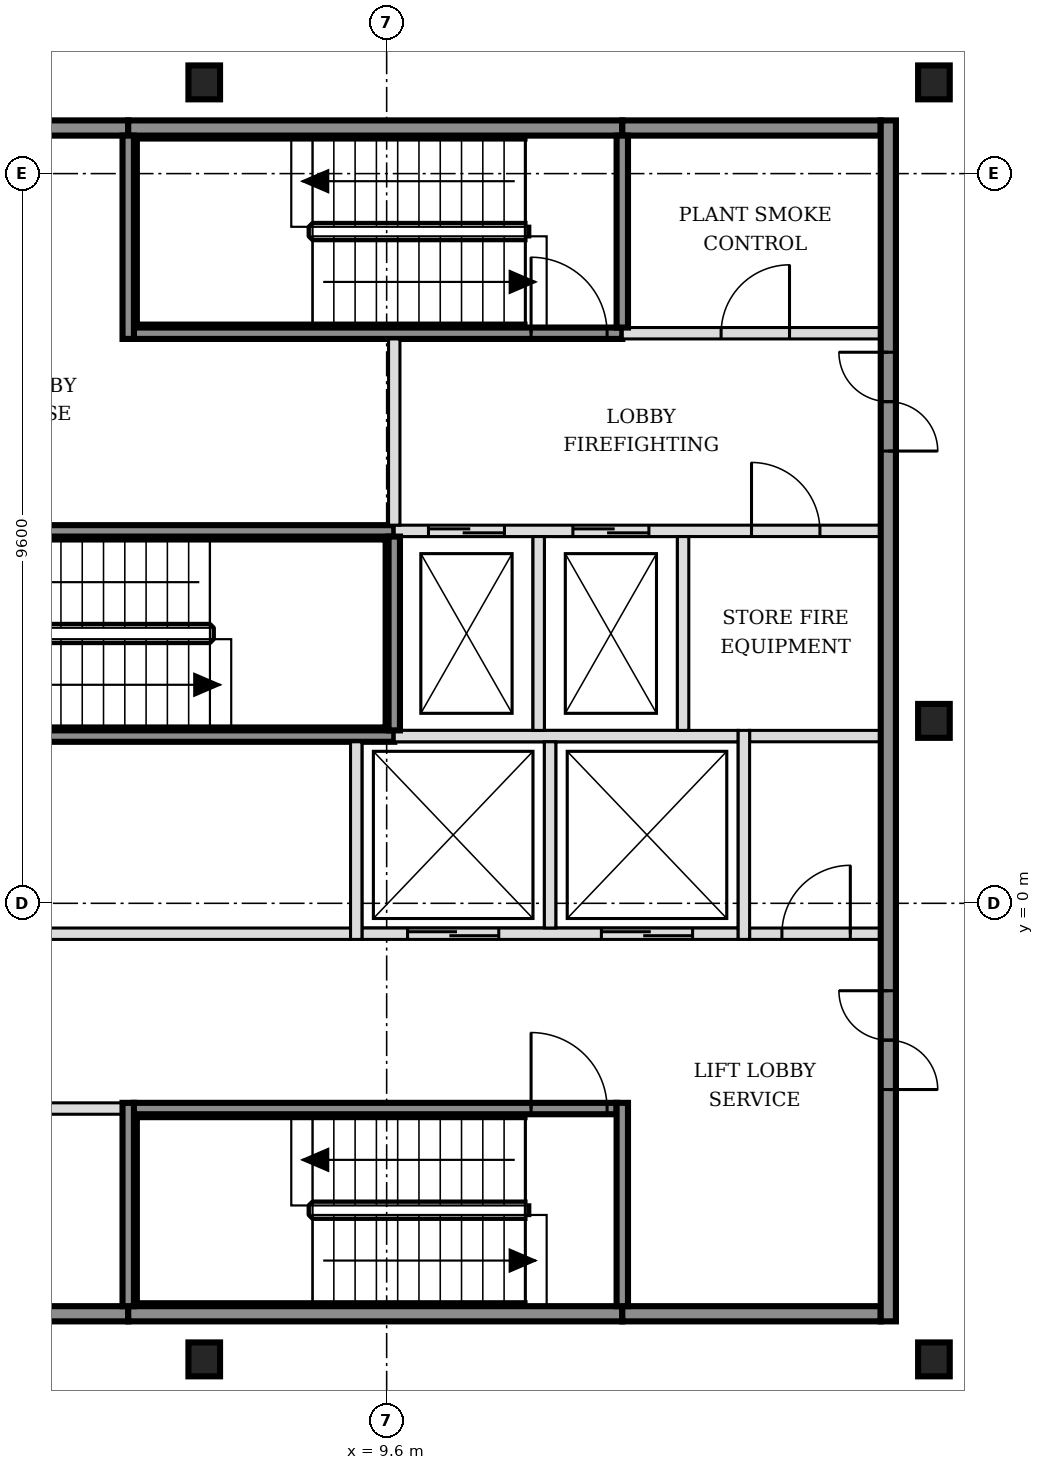
"""IFC4 building model, lengths in metres.
Left out: names, types, materials, properties, quantities, classifications, styles, units other than length and angle.
Written with IfcOpenShell. Run it as: python <this file> out.ifc"""

import sys

from ifc_helpers import new_model, si_unit, direction, frame, frame_2d, origin, origin_2d, place, context, subcontext, project, spatial, rectangle, i_section, extrude, element, fill, save


model = new_model("IFC4")
c1 = context("Model", 3, precision=1e-05, world=origin(), true_north=direction((0.0, 1.0)))
c2 = subcontext(c1, "Body", "Model", "MODEL_VIEW")
j1 = project(units=[si_unit("LENGTHUNIT", "METRE"), si_unit("PLANEANGLEUNIT", "RADIAN")], contexts=[c1])
p1 = place(None, origin())
s1 = spatial("IfcSite", under=j1, at=p1, CompositionType="ELEMENT")
p2 = place(p1, origin())
s2 = spatial("IfcBuilding", under=s1, at=p2, CompositionType="ELEMENT")
p3 = place(p2, frame((0.0, 0.0, 190.2)))
s3 = spatial("IfcBuildingStorey", under=s2, at=p3, CompositionType="ELEMENT", Elevation=190.2)
for number, where, z_axis, x_axis in (
    (1, (7.2, -6.0, -0.15), (0.0, 0.0, 1.0), (1.0, 0.0, 0.0)),
    (2, (16.8, -6.0, -0.15), (0.0, 0.0, 1.0), (1.0, 0.0, 0.0)),
    (3, (16.8, 2.4, -0.15), (0.0, 0.0, 1.0), (1.0, 0.0, 0.0)),
    (4, (7.2, 10.8, -0.15), (0.0, 0.0, 1.0), (1.0, 0.0, 0.0)),
    (5, (16.8, 10.8, -0.15), (0.0, 0.0, 1.0), (1.0, 0.0, 0.0)),
):
    element("IfcColumn", number, at=place(p3, frame(where, z_axis=z_axis, x_axis=x_axis)), inside=s3, PredefinedType="COLUMN", context=c2, shape_type="SweptSolid", body=[
        extrude(i_section(OverallWidth=0.416, OverallDepth=0.446, WebThickness=0.039, FlangeThickness=0.063, FilletRadius=0.015, at=origin_2d()), origin(), (0.0, 0.0, 1.0), 3.6),
    ])
p4 = place(p3, frame((-1.7, -5.4, 0.0), z_axis=(0.0, 0.0, 1.0), x_axis=(1.0, 0.0, 0.0)))
e6 = element("IfcWall", 6, at=p4, inside=s3, PredefinedType="SOLIDWALL", context=c2, shape_type="SweptSolid", body=[
    extrude(rectangle(XDim=7.9, YDim=0.2, at=frame_2d((3.95, 0.0))), origin(), (0.0, 0.0, 1.0), 3.45),
])
p5 = place(p3, frame((6.2, -5.4, 0.0), z_axis=(0.0, 0.0, 1.0), x_axis=(1.0, 0.0, 0.0)))
e7 = element("IfcWall", 7, at=p5, inside=s3, PredefinedType="SOLIDWALL", context=c2, shape_type="SweptSolid", body=[
    extrude(rectangle(XDim=6.5, YDim=0.2, at=frame_2d((3.25, 0.0))), origin(), (0.0, 0.0, 1.0), 3.45),
])
p6 = place(p3, frame((12.7, -5.4, 0.0), z_axis=(0.0, 0.0, 1.0), x_axis=(1.0, 0.0, 0.0)))
e8 = element("IfcWall", 8, at=p6, inside=s3, PredefinedType="SOLIDWALL", context=c2, shape_type="SweptSolid", body=[
    extrude(rectangle(XDim=3.4, YDim=0.2, at=frame_2d((1.7, 0.0))), origin(), (0.0, 0.0, 1.0), 3.45),
])
p7 = place(p3, frame((-1.7, -2.7, 0.0), z_axis=(0.0, 0.0, 1.0), x_axis=(1.0, 0.0, 0.0)))
e9 = element("IfcWall", 9, at=p7, inside=s3, PredefinedType="PARTITIONING", context=c2, shape_type="SweptSolid", body=[
    extrude(rectangle(XDim=7.825, YDim=0.15, at=frame_2d((3.913, 0.0))), origin(), (0.0, 0.0, 1.0), 3.45),
])
p8 = place(p7, frame((3.45, 0.0, 0.0)))
e10 = element("IfcOpeningElement", 10, at=p8, cuts=e9, PredefinedType="OPENING", context=c2, shape_type="SweptSolid", body=[
    extrude(rectangle(XDim=0.9, YDim=2.1, at=frame_2d((0.45, 1.05))), frame((0.0, 0.085, 0.0), z_axis=(0.0, -1.0, 0.0), x_axis=(1.0, 0.0, 0.0)), (0.0, 0.0, 1.0), 0.17),
])
p9 = place(p3, frame((6.275, -2.7, 0.0), z_axis=(0.0, 0.0, 1.0), x_axis=(1.0, 0.0, 0.0)))
e11 = element("IfcWall", 11, at=p9, inside=s3, PredefinedType="SOLIDWALL", context=c2, shape_type="SweptSolid", body=[
    extrude(rectangle(XDim=6.35, YDim=0.15, at=frame_2d((3.175, 0.0))), origin(), (0.0, 0.0, 1.0), 3.45),
])
p10 = place(p9, frame((5.225, 0.0, 0.0)))
e12 = element("IfcOpeningElement", 12, at=p10, cuts=e11, PredefinedType="OPENING", context=c2, shape_type="SweptSolid", body=[
    extrude(rectangle(XDim=1.0, YDim=2.1, at=frame_2d((0.5, 1.05))), frame((0.0, 0.085, 0.0), z_axis=(0.0, -1.0, 0.0), x_axis=(1.0, 0.0, 0.0)), (0.0, 0.0, 1.0), 0.17),
])
p11 = place(p3, frame((-1.7, -0.4, 0.0), z_axis=(0.0, 0.0, 1.0), x_axis=(1.0, 0.0, 0.0)))
e13 = element("IfcWall", 13, at=p11, inside=s3, PredefinedType="PARTITIONING", context=c2, shape_type="SweptSolid", body=[
    extrude(rectangle(XDim=10.825, YDim=0.15, at=frame_2d((5.413, 0.0))), origin(), (0.0, 0.0, 1.0), 3.45),
])
p12 = place(p11, frame((4.95, 0.0, 0.0)))
e14 = element("IfcOpeningElement", 14, at=p12, cuts=e13, PredefinedType="OPENING", context=c2, shape_type="SweptSolid", body=[
    extrude(rectangle(XDim=0.9, YDim=2.1, at=frame_2d((0.45, 1.05))), frame((0.0, 0.085, 0.0), z_axis=(0.0, -1.0, 0.0), x_axis=(1.0, 0.0, 0.0)), (0.0, 0.0, 1.0), 0.17),
])
p13 = place(p3, frame((9.275, -0.4, 0.0), z_axis=(0.0, 0.0, 1.0), x_axis=(1.0, 0.0, 0.0)))
e15 = element("IfcWall", 15, at=p13, inside=s3, PredefinedType="SOLIDWALL", context=c2, shape_type="SweptSolid", body=[
    extrude(rectangle(XDim=4.95, YDim=0.15, at=frame_2d((2.475, 0.0))), origin(), (0.0, 0.0, 1.0), 3.45),
])
p14 = place(p13, frame((0.6, 0.0, 0.0)))
e16 = element("IfcOpeningElement", 16, at=p14, cuts=e15, PredefinedType="OPENING", context=c2, shape_type="SweptSolid", body=[
    extrude(rectangle(XDim=1.2, YDim=2.1, at=frame_2d((0.6, 1.05))), frame((0.0, 0.085, 0.0), z_axis=(0.0, -1.0, 0.0), x_axis=(1.0, 0.0, 0.0)), (0.0, 0.0, 1.0), 0.17),
])
p15 = place(p13, frame((3.15, 0.0, 0.0)))
e17 = element("IfcOpeningElement", 17, at=p15, cuts=e15, PredefinedType="OPENING", context=c2, shape_type="SweptSolid", body=[
    extrude(rectangle(XDim=1.2, YDim=2.1, at=frame_2d((0.6, 1.05))), frame((0.0, 0.085, 0.0), z_axis=(0.0, -1.0, 0.0), x_axis=(1.0, 0.0, 0.0)), (0.0, 0.0, 1.0), 0.17),
])
p16 = place(p3, frame((14.375, -0.4, 0.0), z_axis=(0.0, 0.0, 1.0), x_axis=(1.0, 0.0, 0.0)))
e18 = element("IfcWall", 18, at=p16, inside=s3, PredefinedType="PARTITIONING", context=c2, shape_type="SweptSolid", body=[
    extrude(rectangle(XDim=1.725, YDim=0.15, at=frame_2d((0.863, 0.0))), origin(), (0.0, 0.0, 1.0), 3.45),
])
p17 = place(p16, frame((0.425, 0.0, 0.0)))
e19 = element("IfcOpeningElement", 19, at=p17, cuts=e18, PredefinedType="OPENING", context=c2, shape_type="SweptSolid", body=[
    extrude(rectangle(XDim=0.9, YDim=2.1, at=frame_2d((0.45, 1.05))), frame((0.0, 0.085, 0.0), z_axis=(0.0, -1.0, 0.0), x_axis=(1.0, 0.0, 0.0)), (0.0, 0.0, 1.0), 0.17),
])
p18 = place(p3, frame((3.2, 2.2, 0.0), z_axis=(0.0, 0.0, 1.0), x_axis=(1.0, 0.0, 0.0)))
e20 = element("IfcWall", 20, at=p18, inside=s3, PredefinedType="SOLIDWALL", context=c2, shape_type="SweptSolid", body=[
    extrude(rectangle(XDim=6.5, YDim=0.15, at=frame_2d((3.25, 0.0))), origin(), (0.0, 0.0, 1.0), 3.45),
])
p19 = place(p3, frame((9.7, 2.2, 0.0), z_axis=(0.0, 0.0, 1.0), x_axis=(1.0, 0.0, 0.0)))
e21 = element("IfcWall", 21, at=p19, inside=s3, PredefinedType="SOLIDWALL", context=c2, shape_type="SweptSolid", body=[
    extrude(rectangle(XDim=4.525, YDim=0.15, at=frame_2d((2.263, 0.0))), origin(), (0.0, 0.0, 1.0), 3.45),
])
p20 = place(p3, frame((14.375, 2.2, 0.0), z_axis=(0.0, 0.0, 1.0), x_axis=(1.0, 0.0, 0.0)))
e22 = element("IfcWall", 22, at=p20, inside=s3, PredefinedType="PARTITIONING", context=c2, shape_type="SweptSolid", body=[
    extrude(rectangle(XDim=1.725, YDim=0.15, at=frame_2d((0.863, 0.0))), origin(), (0.0, 0.0, 1.0), 3.45),
])
p21 = place(p3, frame((3.2, 4.9, 0.0), z_axis=(0.0, 0.0, 1.0), x_axis=(1.0, 0.0, 0.0)))
e23 = element("IfcWall", 23, at=p21, inside=s3, PredefinedType="SOLIDWALL", context=c2, shape_type="SweptSolid", body=[
    extrude(rectangle(XDim=6.5, YDim=0.15, at=frame_2d((3.25, 0.0))), origin(), (0.0, 0.0, 1.0), 3.45),
])
p22 = place(p21, frame((0.175, 0.0, 0.0)))
e24 = element("IfcOpeningElement", 24, at=p22, cuts=e23, PredefinedType="OPENING", context=c2, shape_type="SweptSolid", body=[
    extrude(rectangle(XDim=1.0, YDim=2.1, at=frame_2d((0.5, 1.05))), frame((0.0, 0.085, 0.0), z_axis=(0.0, -1.0, 0.0), x_axis=(1.0, 0.0, 0.0)), (0.0, 0.0, 1.0), 0.17),
])
p23 = place(p3, frame((9.7, 4.9, 0.0), z_axis=(0.0, 0.0, 1.0), x_axis=(1.0, 0.0, 0.0)))
e25 = element("IfcWall", 25, at=p23, inside=s3, PredefinedType="SOLIDWALL", context=c2, shape_type="SweptSolid", body=[
    extrude(rectangle(XDim=6.4, YDim=0.15, at=frame_2d((3.2, 0.0))), origin(), (0.0, 0.0, 1.0), 3.45),
])
p24 = place(p23, frame((0.45, 0.0, 0.0)))
e26 = element("IfcOpeningElement", 26, at=p24, cuts=e25, PredefinedType="OPENING", context=c2, shape_type="SweptSolid", body=[
    extrude(rectangle(XDim=1.0, YDim=2.1, at=frame_2d((0.5, 1.05))), frame((0.0, 0.085, 0.0), z_axis=(0.0, -1.0, 0.0), x_axis=(1.0, 0.0, 0.0)), (0.0, 0.0, 1.0), 0.17),
])
p25 = place(p23, frame((2.35, 0.0, 0.0)))
e27 = element("IfcOpeningElement", 27, at=p25, cuts=e25, PredefinedType="OPENING", context=c2, shape_type="SweptSolid", body=[
    extrude(rectangle(XDim=1.0, YDim=2.1, at=frame_2d((0.5, 1.05))), frame((0.0, 0.085, 0.0), z_axis=(0.0, -1.0, 0.0), x_axis=(1.0, 0.0, 0.0)), (0.0, 0.0, 1.0), 0.17),
])
p26 = place(p23, frame((4.7, 0.0, 0.0)))
e28 = element("IfcOpeningElement", 28, at=p26, cuts=e25, PredefinedType="OPENING", context=c2, shape_type="SweptSolid", body=[
    extrude(rectangle(XDim=0.9, YDim=2.1, at=frame_2d((0.45, 1.05))), frame((0.0, 0.085, 0.0), z_axis=(0.0, -1.0, 0.0), x_axis=(1.0, 0.0, 0.0)), (0.0, 0.0, 1.0), 0.17),
])
p27 = place(p3, frame((6.275, 7.5, 0.0), z_axis=(0.0, 0.0, 1.0), x_axis=(1.0, 0.0, 0.0)))
e29 = element("IfcWall", 29, at=p27, inside=s3, PredefinedType="SOLIDWALL", context=c2, shape_type="SweptSolid", body=[
    extrude(rectangle(XDim=6.425, YDim=0.15, at=frame_2d((3.212, 0.0))), origin(), (0.0, 0.0, 1.0), 3.45),
])
p28 = place(p27, frame((5.225, 0.0, 0.0)))
e30 = element("IfcOpeningElement", 30, at=p28, cuts=e29, PredefinedType="OPENING", context=c2, shape_type="SweptSolid", body=[
    extrude(rectangle(XDim=1.0, YDim=2.1, at=frame_2d((0.5, 1.05))), frame((0.0, 0.085, 0.0), z_axis=(0.0, -1.0, 0.0), x_axis=(1.0, 0.0, 0.0)), (0.0, 0.0, 1.0), 0.17),
])
p29 = place(p3, frame((12.7, 7.5, 0.0), z_axis=(0.0, 0.0, 1.0), x_axis=(1.0, 0.0, 0.0)))
e31 = element("IfcWall", 31, at=p29, inside=s3, PredefinedType="SOLIDWALL", context=c2, shape_type="SweptSolid", body=[
    extrude(rectangle(XDim=3.4, YDim=0.15, at=frame_2d((1.7, 0.0))), origin(), (0.0, 0.0, 1.0), 3.45),
])
p30 = place(p29, frame((1.3, 0.0, 0.0)))
e32 = element("IfcOpeningElement", 32, at=p30, cuts=e31, PredefinedType="OPENING", context=c2, shape_type="SweptSolid", body=[
    extrude(rectangle(XDim=0.9, YDim=2.1, at=frame_2d((0.45, 1.05))), frame((0.0, 0.085, 0.0), z_axis=(0.0, -1.0, 0.0), x_axis=(1.0, 0.0, 0.0)), (0.0, 0.0, 1.0), 0.17),
])
p31 = place(p3, frame((-1.7, 10.2, 0.0), z_axis=(0.0, 0.0, 1.0), x_axis=(1.0, 0.0, 0.0)))
e33 = element("IfcWall", 33, at=p31, inside=s3, PredefinedType="SOLIDWALL", context=c2, shape_type="SweptSolid", body=[
    extrude(rectangle(XDim=7.9, YDim=0.2, at=frame_2d((3.95, 0.0))), origin(), (0.0, 0.0, 1.0), 3.45),
])
p32 = place(p3, frame((6.2, 10.2, 0.0), z_axis=(0.0, 0.0, 1.0), x_axis=(1.0, 0.0, 0.0)))
e34 = element("IfcWall", 34, at=p32, inside=s3, PredefinedType="SOLIDWALL", context=c2, shape_type="SweptSolid", body=[
    extrude(rectangle(XDim=6.5, YDim=0.2, at=frame_2d((3.25, 0.0))), origin(), (0.0, 0.0, 1.0), 3.45),
])
p33 = place(p3, frame((12.7, 10.2, 0.0), z_axis=(0.0, 0.0, 1.0), x_axis=(1.0, 0.0, 0.0)))
e35 = element("IfcWall", 35, at=p33, inside=s3, PredefinedType="SOLIDWALL", context=c2, shape_type="SweptSolid", body=[
    extrude(rectangle(XDim=3.4, YDim=0.2, at=frame_2d((1.7, 0.0))), origin(), (0.0, 0.0, 1.0), 3.45),
])
for number, where, z_axis, x_axis in (
    (36, (6.2, -5.3, 0.0), (0.0, 0.0, 1.0), (0.0, 1.0, 0.0)),
    (37, (6.2, 7.425, 0.0), (0.0, 0.0, 1.0), (0.0, 1.0, 0.0)),
):
    element("IfcWall", number, at=place(p3, frame(where, z_axis=z_axis, x_axis=x_axis)), inside=s3, PredefinedType="SOLIDWALL", context=c2, shape_type="SweptSolid", body=[
        extrude(rectangle(XDim=2.675, YDim=0.15, at=frame_2d((1.337, 0.0))), origin(), (0.0, 0.0, 1.0), 3.45),
    ])
p34 = place(p3, frame((9.2, -0.475, 0.0), z_axis=(0.0, 0.0, 1.0), x_axis=(0.0, 1.0, 0.0)))
e38 = element("IfcWall", 38, at=p34, inside=s3, PredefinedType="SOLIDWALL", context=c2, shape_type="SweptSolid", body=[
    extrude(rectangle(XDim=2.6, YDim=0.15, at=frame_2d((1.3, 0.0))), origin(), (0.0, 0.0, 1.0), 3.45),
])
p35 = place(p3, frame((9.7, 2.275, 0.0), z_axis=(0.0, 0.0, 1.0), x_axis=(0.0, 1.0, 0.0)))
e39 = element("IfcWall", 39, at=p35, inside=s3, PredefinedType="SOLIDWALL", context=c2, shape_type="SweptSolid", body=[
    extrude(rectangle(XDim=2.55, YDim=0.15, at=frame_2d((1.275, 0.0))), origin(), (0.0, 0.0, 1.0), 3.45),
])
p36 = place(p3, frame((9.7, 4.975, 0.0), z_axis=(0.0, 0.0, 1.0), x_axis=(0.0, 1.0, 0.0)))
e40 = element("IfcWall", 40, at=p36, inside=s3, PredefinedType="SOLIDWALL", context=c2, shape_type="SweptSolid", body=[
    extrude(rectangle(XDim=2.45, YDim=0.15, at=frame_2d((1.225, 0.0))), origin(), (0.0, 0.0, 1.0), 3.45),
])
p37 = place(p3, frame((11.6, 2.275, 0.0), z_axis=(0.0, 0.0, 1.0), x_axis=(0.0, 1.0, 0.0)))
e41 = element("IfcWall", 41, at=p37, inside=s3, PredefinedType="SOLIDWALL", context=c2, shape_type="SweptSolid", body=[
    extrude(rectangle(XDim=2.55, YDim=0.15, at=frame_2d((1.275, 0.0))), origin(), (0.0, 0.0, 1.0), 3.45),
])
p38 = place(p3, frame((11.75, -0.325, 0.0), z_axis=(0.0, 0.0, 1.0), x_axis=(0.0, 1.0, 0.0)))
e42 = element("IfcWall", 42, at=p38, inside=s3, PredefinedType="SOLIDWALL", context=c2, shape_type="SweptSolid", body=[
    extrude(rectangle(XDim=2.45, YDim=0.15, at=frame_2d((1.225, 0.0))), origin(), (0.0, 0.0, 1.0), 3.45),
])
p39 = place(p3, frame((12.7, -5.3, 0.0), z_axis=(0.0, 0.0, 1.0), x_axis=(0.0, 1.0, 0.0)))
e43 = element("IfcWall", 43, at=p39, inside=s3, PredefinedType="SOLIDWALL", context=c2, shape_type="SweptSolid", body=[
    extrude(rectangle(XDim=2.675, YDim=0.15, at=frame_2d((1.337, 0.0))), origin(), (0.0, 0.0, 1.0), 3.45),
])
p40 = place(p3, frame((12.7, 7.575, 0.0), z_axis=(0.0, 0.0, 1.0), x_axis=(0.0, 1.0, 0.0)))
e44 = element("IfcWall", 44, at=p40, inside=s3, PredefinedType="SOLIDWALL", context=c2, shape_type="SweptSolid", body=[
    extrude(rectangle(XDim=2.525, YDim=0.15, at=frame_2d((1.263, 0.0))), origin(), (0.0, 0.0, 1.0), 3.45),
])
p41 = place(p3, frame((13.5, 2.275, 0.0), z_axis=(0.0, 0.0, 1.0), x_axis=(0.0, 1.0, 0.0)))
e45 = element("IfcWall", 45, at=p41, inside=s3, PredefinedType="SOLIDWALL", context=c2, shape_type="SweptSolid", body=[
    extrude(rectangle(XDim=2.55, YDim=0.15, at=frame_2d((1.275, 0.0))), origin(), (0.0, 0.0, 1.0), 3.45),
])
p42 = place(p3, frame((14.3, -0.475, 0.0), z_axis=(0.0, 0.0, 1.0), x_axis=(0.0, 1.0, 0.0)))
e46 = element("IfcWall", 46, at=p42, inside=s3, PredefinedType="SOLIDWALL", context=c2, shape_type="SweptSolid", body=[
    extrude(rectangle(XDim=2.75, YDim=0.15, at=frame_2d((1.375, 0.0))), origin(), (0.0, 0.0, 1.0), 3.45),
])
p43 = place(p3, frame((16.2, -5.5, 0.0), z_axis=(0.0, 0.0, 1.0), x_axis=(0.0, 1.0, 0.0)))
e47 = element("IfcWall", 47, at=p43, inside=s3, PredefinedType="SOLIDWALL", context=c2, shape_type="SweptSolid", body=[
    extrude(rectangle(XDim=15.8, YDim=0.2, at=frame_2d((7.9, 0.0))), origin(), (0.0, 0.0, 1.0), 3.45),
])
p44 = place(p43, frame((3.05, 0.0, 0.0)))
e48 = element("IfcOpeningElement", 48, at=p44, cuts=e47, PredefinedType="OPENING", context=c2, shape_type="SweptSolid", body=[
    extrude(rectangle(XDim=1.3, YDim=2.1, at=frame_2d((0.65, 1.05))), frame((0.0, 0.11, 0.0), z_axis=(0.0, -1.0, 0.0), x_axis=(1.0, 0.0, 0.0)), (0.0, 0.0, 1.0), 0.22),
])
p45 = place(p43, frame((11.45, 0.0, 0.0)))
e49 = element("IfcOpeningElement", 49, at=p45, cuts=e47, PredefinedType="OPENING", context=c2, shape_type="SweptSolid", body=[
    extrude(rectangle(XDim=1.3, YDim=2.1, at=frame_2d((0.65, 1.05))), frame((0.0, 0.11, 0.0), z_axis=(0.0, -1.0, 0.0), x_axis=(1.0, 0.0, 0.0)), (0.0, 0.0, 1.0), 0.22),
])
p46 = place(p14, origin())
e50 = element("IfcDoor", 50, at=p46, inside=s3, OperationType="DOUBLE_DOOR_SLIDING", PredefinedType="DOOR", context=c2, shape_type="SweptSolid", body=[
    extrude(rectangle(XDim=1.2, YDim=2.1, at=frame_2d((0.6, 1.05))), frame((0.0, 0.025, 0.0), z_axis=(0.0, -1.0, 0.0), x_axis=(1.0, 0.0, 0.0)), (0.0, 0.0, 1.0), 0.05),
])
fill(e16, e50)
p47 = place(p15, origin())
e51 = element("IfcDoor", 51, at=p47, inside=s3, OperationType="DOUBLE_DOOR_SLIDING", PredefinedType="DOOR", context=c2, shape_type="SweptSolid", body=[
    extrude(rectangle(XDim=1.2, YDim=2.1, at=frame_2d((0.6, 1.05))), frame((0.0, 0.025, 0.0), z_axis=(0.0, -1.0, 0.0), x_axis=(1.0, 0.0, 0.0)), (0.0, 0.0, 1.0), 0.05),
])
fill(e17, e51)
p48 = place(p24, origin())
e52 = element("IfcDoor", 52, at=p48, inside=s3, OperationType="DOUBLE_DOOR_SLIDING", PredefinedType="DOOR", context=c2, shape_type="SweptSolid", body=[
    extrude(rectangle(XDim=1.0, YDim=2.1, at=frame_2d((0.5, 1.05))), frame((0.0, 0.025, 0.0), z_axis=(0.0, -1.0, 0.0), x_axis=(1.0, 0.0, 0.0)), (0.0, 0.0, 1.0), 0.05),
])
fill(e26, e52)
p49 = place(p25, origin())
e53 = element("IfcDoor", 53, at=p49, inside=s3, OperationType="DOUBLE_DOOR_SLIDING", PredefinedType="DOOR", context=c2, shape_type="SweptSolid", body=[
    extrude(rectangle(XDim=1.0, YDim=2.1, at=frame_2d((0.5, 1.05))), frame((0.0, 0.025, 0.0), z_axis=(0.0, -1.0, 0.0), x_axis=(1.0, 0.0, 0.0)), (0.0, 0.0, 1.0), 0.05),
])
fill(e27, e53)
p50 = place(p10, origin())
e54 = element("IfcDoor", 54, at=p50, inside=s3, OperationType="SINGLE_SWING_LEFT", PredefinedType="DOOR", context=c2, shape_type="SweptSolid", body=[
    extrude(rectangle(XDim=1.0, YDim=2.1, at=frame_2d((0.5, 1.05))), frame((0.0, 0.025, 0.0), z_axis=(0.0, -1.0, 0.0), x_axis=(1.0, 0.0, 0.0)), (0.0, 0.0, 1.0), 0.05),
])
fill(e12, e54)
p51 = place(p28, origin())
e55 = element("IfcDoor", 55, at=p51, inside=s3, OperationType="SINGLE_SWING_LEFT", PredefinedType="DOOR", context=c2, shape_type="SweptSolid", body=[
    extrude(rectangle(XDim=1.0, YDim=2.1, at=frame_2d((0.5, 1.05))), frame((0.0, 0.025, 0.0), z_axis=(0.0, -1.0, 0.0), x_axis=(1.0, 0.0, 0.0)), (0.0, 0.0, 1.0), 0.05),
])
fill(e30, e55)
p52 = place(p44, origin())
e56 = element("IfcDoor", 56, at=p52, inside=s3, OperationType="DOUBLE_DOOR_SINGLE_SWING", PredefinedType="DOOR", context=c2, shape_type="SweptSolid", body=[
    extrude(rectangle(XDim=1.3, YDim=2.1, at=frame_2d((0.65, 1.05))), frame((0.0, 0.025, 0.0), z_axis=(0.0, -1.0, 0.0), x_axis=(1.0, 0.0, 0.0)), (0.0, 0.0, 1.0), 0.05),
])
fill(e48, e56)
p53 = place(p45, origin())
e57 = element("IfcDoor", 57, at=p53, inside=s3, OperationType="DOUBLE_DOOR_SINGLE_SWING", PredefinedType="DOOR", context=c2, shape_type="SweptSolid", body=[
    extrude(rectangle(XDim=1.3, YDim=2.1, at=frame_2d((0.65, 1.05))), frame((0.0, 0.025, 0.0), z_axis=(0.0, -1.0, 0.0), x_axis=(1.0, 0.0, 0.0)), (0.0, 0.0, 1.0), 0.05),
])
fill(e49, e57)
p54 = place(p17, origin())
e58 = element("IfcDoor", 58, at=p54, inside=s3, OperationType="SINGLE_SWING_RIGHT", PredefinedType="DOOR", context=c2, shape_type="SweptSolid", body=[
    extrude(rectangle(XDim=0.9, YDim=2.1, at=frame_2d((0.45, 1.05))), frame((0.0, 0.025, 0.0), z_axis=(0.0, -1.0, 0.0), x_axis=(1.0, 0.0, 0.0)), (0.0, 0.0, 1.0), 0.05),
])
fill(e19, e58)
p55 = place(p26, origin())
e59 = element("IfcDoor", 59, at=p55, inside=s3, OperationType="SINGLE_SWING_LEFT", PredefinedType="DOOR", context=c2, shape_type="SweptSolid", body=[
    extrude(rectangle(XDim=0.9, YDim=2.1, at=frame_2d((0.45, 1.05))), frame((0.0, 0.025, 0.0), z_axis=(0.0, -1.0, 0.0), x_axis=(1.0, 0.0, 0.0)), (0.0, 0.0, 1.0), 0.05),
])
fill(e28, e59)
p56 = place(p30, origin())
e60 = element("IfcDoor", 60, at=p56, inside=s3, OperationType="SINGLE_SWING_RIGHT", PredefinedType="DOOR", context=c2, shape_type="SweptSolid", body=[
    extrude(rectangle(XDim=0.9, YDim=2.1, at=frame_2d((0.45, 1.05))), frame((0.0, 0.025, 0.0), z_axis=(0.0, -1.0, 0.0), x_axis=(1.0, 0.0, 0.0)), (0.0, 0.0, 1.0), 0.05),
])
fill(e32, e60)
save(model, sys.argv[1])
